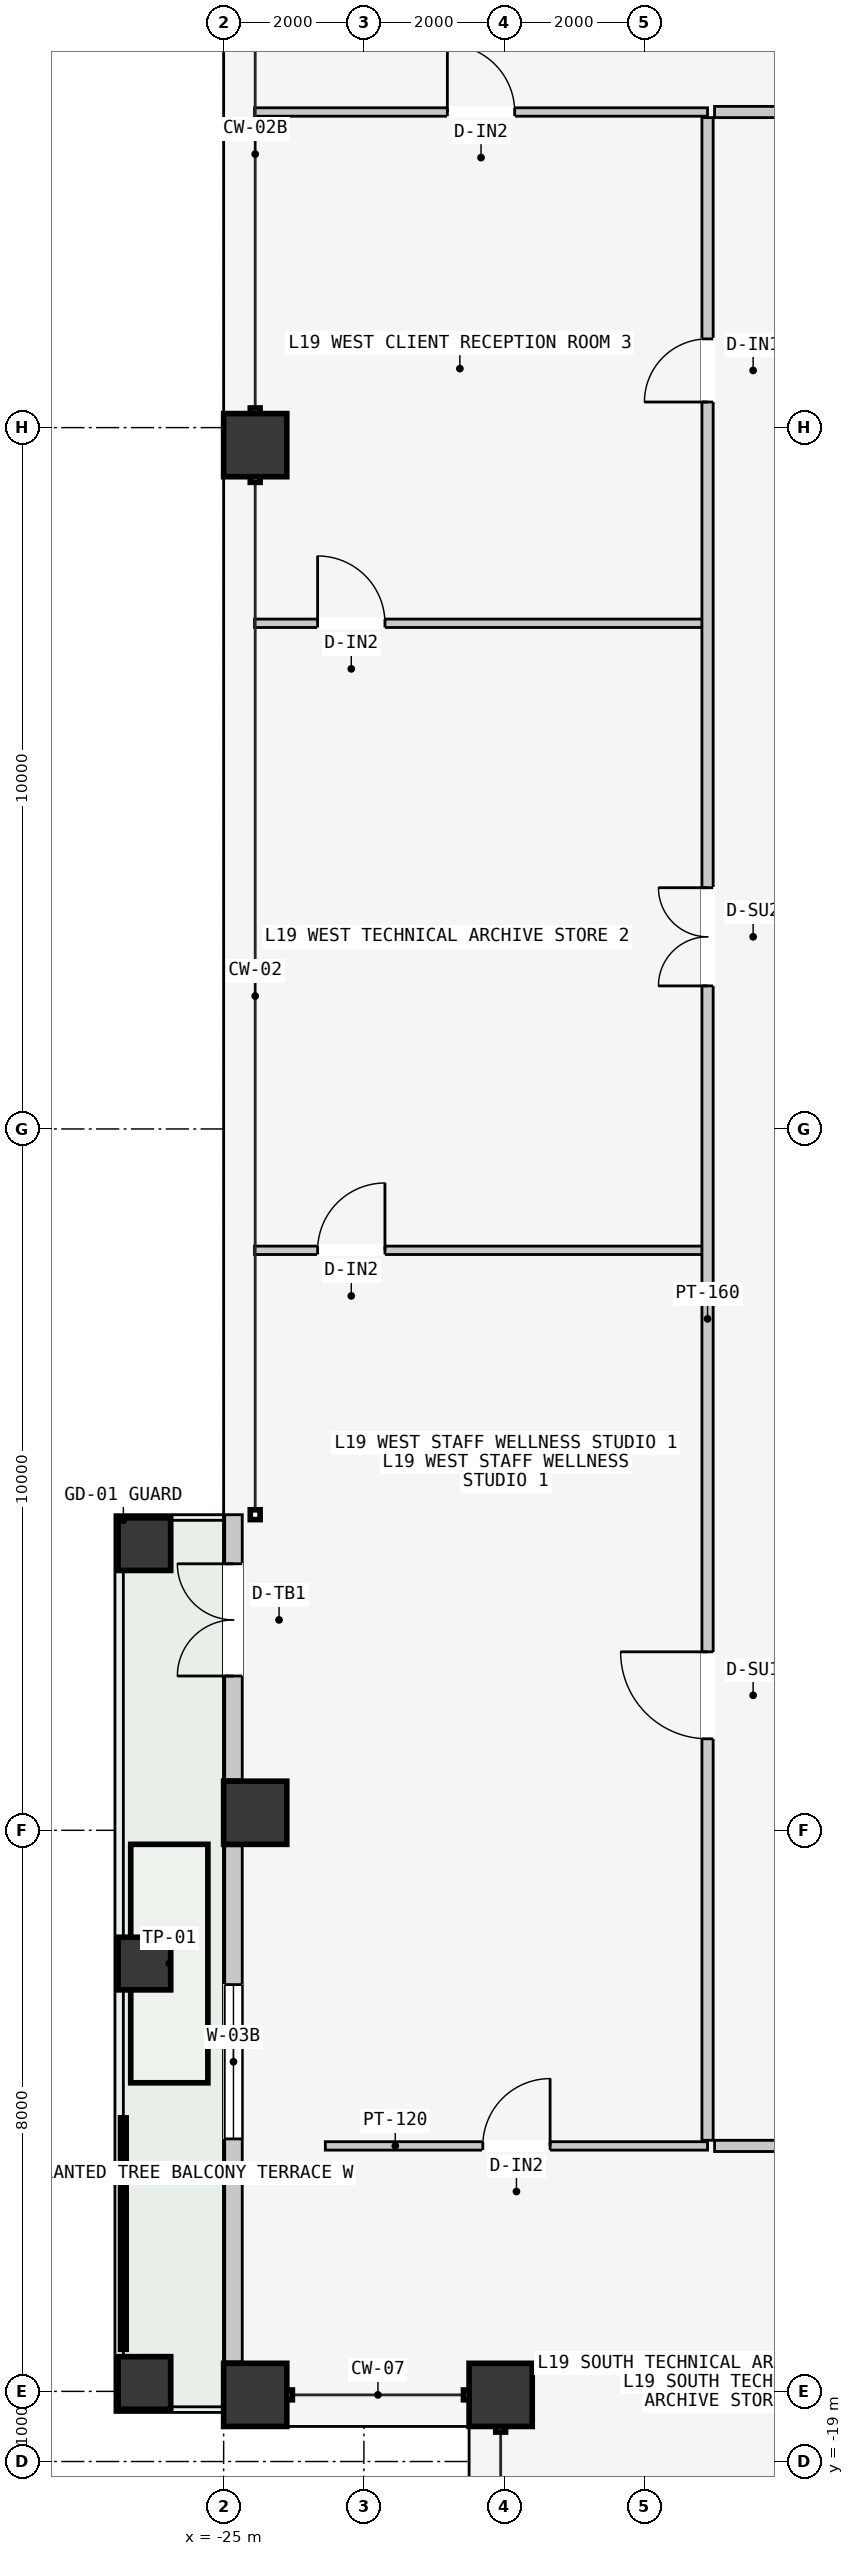
"""IFC4 building model, lengths in metres.
Left out: names, types, materials, properties, quantities, classifications, styles, units other than length and angle.
Written with IfcOpenShell. Run it as: python <this file> out.ifc"""

import sys

from ifc_helpers import new_model, si_unit, direction, frame, frame_2d, origin, origin_2d, place, context, subcontext, project, spatial, rectangle, hollow_rectangle, extrude, element, fill, save


model = new_model("IFC4")
c1 = context("Model", 3, precision=1e-05, world=origin(), true_north=direction((0.0, 1.0)))
c2 = subcontext(c1, "Body", "Model", "MODEL_VIEW")
j1 = project(units=[si_unit("LENGTHUNIT", "METRE"), si_unit("PLANEANGLEUNIT", "RADIAN")], contexts=[c1])
p1 = place(None, origin())
s1 = spatial("IfcSite", under=j1, at=p1, CompositionType="ELEMENT")
p2 = place(p1, origin())
s2 = spatial("IfcBuilding", under=s1, at=p2, CompositionType="ELEMENT")
p3 = place(p2, frame((0.0, 0.0, 74.4)))
s3 = spatial("IfcBuildingStorey", under=s2, at=p3, CompositionType="ELEMENT", Elevation=74.4)
for number, where, z_axis, x_axis in (
    (1, (-24.55, -18.05, 0.0), (0.0, 0.0, 1.0), (0.0, 1.0, 0.0)),
    (2, (-24.55, -9.75, 0.0), (0.0, 0.0, 1.0), (0.0, 1.0, 0.0)),
    (3, (-24.55, 9.75, 0.0), (0.0, 0.0, 1.0), (0.0, 1.0, 0.0)),
    (4, (-21.05, -18.05, 0.0), (0.0, 0.0, 1.0), (1.0, 0.0, 0.0)),
):
    element("IfcColumn", number, at=place(p3, frame(where, z_axis=z_axis, x_axis=x_axis)), inside=s3, PredefinedType="COLUMN", context=c2, shape_type="SweptSolid", body=[
        extrude(hollow_rectangle(XDim=0.9, YDim=0.9, WallThickness=0.045, at=origin_2d()), origin(), (0.0, 0.0, 1.0), 3.6),
    ])
for number, where, z_axis, x_axis in (
    (5, (-26.13, -17.88, 0.0), (0.0, 0.0, 1.0), (0.0, 1.0, 0.0)),
    (6, (-26.13, -5.92, 0.0), (0.0, 0.0, 1.0), (0.0, 1.0, 0.0)),
    (7, (-26.13, -11.9, 0.0), (0.0, 0.0, 1.0), (0.0, 1.0, 0.0)),
):
    element("IfcColumn", number, at=place(p3, frame(where, z_axis=z_axis, x_axis=x_axis)), inside=s3, PredefinedType="COLUMN", context=c2, shape_type="SweptSolid", body=[
        extrude(hollow_rectangle(XDim=0.75, YDim=0.75, WallThickness=0.032, at=origin_2d()), origin(), (0.0, 0.0, 1.0), 3.6),
    ])
p4 = place(p3, frame((-24.86, -17.58, 0.0), z_axis=(0.0, 0.0, 1.0), x_axis=(0.0, 1.0, 0.0)))
e8 = element("IfcWall", 8, at=p4, inside=s3, PredefinedType="STANDARD", context=c2, shape_type="SweptSolid", body=[
    extrude(rectangle(XDim=7.36, YDim=0.25, at=frame_2d((3.68, 0.0))), origin(), (0.0, 0.0, 1.0), 3.4),
])
p5 = place(p4, frame((3.18, 0.0, 0.85)))
e9 = element("IfcOpeningElement", 9, at=p5, cuts=e8, PredefinedType="OPENING", context=c2, shape_type="SweptSolid", body=[
    extrude(rectangle(XDim=2.2, YDim=2.1, at=frame_2d((1.1, 1.05))), frame((0.0, 0.135, 0.0), z_axis=(0.0, -1.0, 0.0), x_axis=(1.0, 0.0, 0.0)), (0.0, 0.0, 1.0), 0.27),
])
p6 = place(p3, frame((-24.86, -9.28, 0.0), z_axis=(0.0, 0.0, 1.0), x_axis=(0.0, 1.0, 0.0)))
e10 = element("IfcWall", 10, at=p6, inside=s3, PredefinedType="STANDARD", context=c2, shape_type="SweptSolid", body=[
    extrude(rectangle(XDim=3.78, YDim=0.25, at=frame_2d((1.89, 0.0))), origin(), (0.0, 0.0, 1.0), 3.4),
])
p7 = place(p6, frame((1.48, 0.0, 0.0)))
e11 = element("IfcOpeningElement", 11, at=p7, cuts=e10, PredefinedType="OPENING", context=c2, shape_type="SweptSolid", body=[
    extrude(rectangle(XDim=1.6, YDim=2.2, at=frame_2d((0.8, 1.1))), frame((0.0, 0.135, 0.0), z_axis=(0.0, -1.0, 0.0), x_axis=(1.0, 0.0, 0.0)), (0.0, 0.0, 1.0), 0.27),
])
p8 = place(p3, frame((-18.0, 14.5, 0.0), z_axis=(0.0, 0.0, 1.0), x_axis=(1.0, 0.0, 0.0)))
e12 = element("IfcWall", 12, at=p8, inside=s3, PredefinedType="PARTITIONING", context=c2, shape_type="SweptSolid", body=[
    extrude(rectangle(XDim=36.0, YDim=0.16, at=frame_2d((18.0, 0.0))), origin(), (0.0, 0.0, 1.0), 3.4),
])
p9 = place(p8, frame((4.09, 0.0, 0.0)))
e13 = element("IfcOpeningElement", 13, at=p9, cuts=e12, PredefinedType="OPENING", context=c2, shape_type="SweptSolid", body=[
    extrude(rectangle(XDim=1.06, YDim=2.2, at=frame_2d((0.53, 1.1))), frame((0.0, 0.09, 0.0), z_axis=(0.0, -1.0, 0.0), x_axis=(1.0, 0.0, 0.0)), (0.0, 0.0, 1.0), 0.18),
])
p10 = place(p8, frame((17.579, 0.0, 0.0)))
e14 = element("IfcOpeningElement", 14, at=p10, cuts=e12, PredefinedType="OPENING", context=c2, shape_type="SweptSolid", body=[
    extrude(rectangle(XDim=1.24, YDim=2.24, at=frame_2d((0.62, 1.12))), frame((0.0, 0.09, 0.0), z_axis=(0.0, -1.0, 0.0), x_axis=(1.0, 0.0, 0.0)), (0.0, 0.0, 1.0), 0.18),
])
p11 = place(p8, frame((30.879, 0.0, 0.0)))
e15 = element("IfcOpeningElement", 15, at=p11, cuts=e12, PredefinedType="OPENING", context=c2, shape_type="SweptSolid", body=[
    extrude(rectangle(XDim=1.4, YDim=2.2, at=frame_2d((0.7, 1.1))), frame((0.0, 0.09, 0.0), z_axis=(0.0, -1.0, 0.0), x_axis=(1.0, 0.0, 0.0)), (0.0, 0.0, 1.0), 0.18),
])
p12 = place(p3, frame((-24.56, 14.5, 0.0), z_axis=(0.0, 0.0, 1.0), x_axis=(1.0, 0.0, 0.0)))
e16 = element("IfcWall", 16, at=p12, inside=s3, PredefinedType="PARTITIONING", context=c2, shape_type="SweptSolid", body=[
    extrude(rectangle(XDim=6.46, YDim=0.12, at=frame_2d((3.23, 0.0))), origin(), (0.0, 0.0, 1.0), 3.4),
])
p13 = place(p12, frame((2.75, 0.0, 0.0)))
e17 = element("IfcOpeningElement", 17, at=p13, cuts=e16, PredefinedType="OPENING", context=c2, shape_type="SweptSolid", body=[
    extrude(rectangle(XDim=0.96, YDim=2.18, at=frame_2d((0.48, 1.09))), frame((0.0, 0.07, 0.0), z_axis=(0.0, -1.0, 0.0), x_axis=(1.0, 0.0, 0.0)), (0.0, 0.0, 1.0), 0.14),
])
p14 = place(p3, frame((-18.0, -14.5, 0.0), z_axis=(0.0, 0.0, 1.0), x_axis=(1.0, 0.0, 0.0)))
e18 = element("IfcWall", 18, at=p14, inside=s3, PredefinedType="PARTITIONING", context=c2, shape_type="SweptSolid", body=[
    extrude(rectangle(XDim=36.0, YDim=0.16, at=frame_2d((18.0, 0.0))), origin(), (0.0, 0.0, 1.0), 3.4),
])
p15 = place(p14, frame((1.515, 0.0, 0.0)))
e19 = element("IfcOpeningElement", 19, at=p15, cuts=e18, PredefinedType="OPENING", context=c2, shape_type="SweptSolid", body=[
    extrude(rectangle(XDim=0.9, YDim=2.15, at=frame_2d((0.45, 1.075))), frame((0.0, 0.09, 0.0), z_axis=(0.0, -1.0, 0.0), x_axis=(1.0, 0.0, 0.0)), (0.0, 0.0, 1.0), 0.18),
])
p16 = place(p14, frame((7.299, 0.0, 0.0)))
e20 = element("IfcOpeningElement", 20, at=p16, cuts=e18, PredefinedType="OPENING", context=c2, shape_type="SweptSolid", body=[
    extrude(rectangle(XDim=0.96, YDim=2.18, at=frame_2d((0.48, 1.09))), frame((0.0, 0.09, 0.0), z_axis=(0.0, -1.0, 0.0), x_axis=(1.0, 0.0, 0.0)), (0.0, 0.0, 1.0), 0.18),
])
p17 = place(p14, frame((15.101, 0.0, 0.0)))
e21 = element("IfcOpeningElement", 21, at=p17, cuts=e18, PredefinedType="OPENING", context=c2, shape_type="SweptSolid", body=[
    extrude(rectangle(XDim=1.02, YDim=2.2, at=frame_2d((0.51, 1.1))), frame((0.0, 0.09, 0.0), z_axis=(0.0, -1.0, 0.0), x_axis=(1.0, 0.0, 0.0)), (0.0, 0.0, 1.0), 0.18),
])
p18 = place(p14, frame((23.443, 0.0, 0.0)))
e22 = element("IfcOpeningElement", 22, at=p18, cuts=e18, PredefinedType="OPENING", context=c2, shape_type="SweptSolid", body=[
    extrude(rectangle(XDim=1.06, YDim=2.2, at=frame_2d((0.53, 1.1))), frame((0.0, 0.09, 0.0), z_axis=(0.0, -1.0, 0.0), x_axis=(1.0, 0.0, 0.0)), (0.0, 0.0, 1.0), 0.18),
])
p19 = place(p14, frame((31.557, 0.0, 0.0)))
e23 = element("IfcOpeningElement", 23, at=p19, cuts=e18, PredefinedType="OPENING", context=c2, shape_type="SweptSolid", body=[
    extrude(rectangle(XDim=1.24, YDim=2.24, at=frame_2d((0.62, 1.12))), frame((0.0, 0.09, 0.0), z_axis=(0.0, -1.0, 0.0), x_axis=(1.0, 0.0, 0.0)), (0.0, 0.0, 1.0), 0.18),
])
p20 = place(p3, frame((-23.55, -14.5, 0.0), z_axis=(0.0, 0.0, 1.0), x_axis=(1.0, 0.0, 0.0)))
e24 = element("IfcWall", 24, at=p20, inside=s3, PredefinedType="PARTITIONING", context=c2, shape_type="SweptSolid", body=[
    extrude(rectangle(XDim=5.45, YDim=0.12, at=frame_2d((2.725, 0.0))), origin(), (0.0, 0.0, 1.0), 3.4),
])
p21 = place(p20, frame((2.245, 0.0, 0.0)))
e25 = element("IfcOpeningElement", 25, at=p21, cuts=e24, PredefinedType="OPENING", context=c2, shape_type="SweptSolid", body=[
    extrude(rectangle(XDim=0.96, YDim=2.18, at=frame_2d((0.48, 1.09))), frame((0.0, 0.07, 0.0), z_axis=(0.0, -1.0, 0.0), x_axis=(1.0, 0.0, 0.0)), (0.0, 0.0, 1.0), 0.14),
])
p22 = place(p3, frame((-24.56, -1.73, 0.0), z_axis=(0.0, 0.0, 1.0), x_axis=(1.0, 0.0, 0.0)))
e26 = element("IfcWall", 26, at=p22, inside=s3, PredefinedType="PARTITIONING", context=c2, shape_type="SweptSolid", body=[
    extrude(rectangle(XDim=6.4, YDim=0.12, at=frame_2d((3.2, 0.0))), origin(), (0.0, 0.0, 1.0), 3.4),
])
p23 = place(p22, frame((0.9, 0.0, 0.0)))
e27 = element("IfcOpeningElement", 27, at=p23, cuts=e26, PredefinedType="OPENING", context=c2, shape_type="SweptSolid", body=[
    extrude(rectangle(XDim=0.96, YDim=2.18, at=frame_2d((0.48, 1.09))), frame((0.0, 0.07, 0.0), z_axis=(0.0, -1.0, 0.0), x_axis=(1.0, 0.0, 0.0)), (0.0, 0.0, 1.0), 0.14),
])
p24 = place(p3, frame((-24.56, 7.21, 0.0), z_axis=(0.0, 0.0, 1.0), x_axis=(1.0, 0.0, 0.0)))
e28 = element("IfcWall", 28, at=p24, inside=s3, PredefinedType="PARTITIONING", context=c2, shape_type="SweptSolid", body=[
    extrude(rectangle(XDim=6.4, YDim=0.12, at=frame_2d((3.2, 0.0))), origin(), (0.0, 0.0, 1.0), 3.4),
])
p25 = place(p24, frame((0.9, 0.0, 0.0)))
e29 = element("IfcOpeningElement", 29, at=p25, cuts=e28, PredefinedType="OPENING", context=c2, shape_type="SweptSolid", body=[
    extrude(rectangle(XDim=0.96, YDim=2.18, at=frame_2d((0.48, 1.09))), frame((0.0, 0.07, 0.0), z_axis=(0.0, -1.0, 0.0), x_axis=(1.0, 0.0, 0.0)), (0.0, 0.0, 1.0), 0.14),
])
p26 = place(p3, frame((-18.1, -14.42, 0.0), z_axis=(0.0, 0.0, 1.0), x_axis=(0.0, 1.0, 0.0)))
e30 = element("IfcWall", 30, at=p26, inside=s3, PredefinedType="PARTITIONING", context=c2, shape_type="SweptSolid", body=[
    extrude(rectangle(XDim=28.84, YDim=0.16, at=frame_2d((14.42, 0.0))), origin(), (0.0, 0.0, 1.0), 3.4),
])
p27 = place(p26, frame((5.725, 0.0, 0.0)))
e31 = element("IfcOpeningElement", 31, at=p27, cuts=e30, PredefinedType="OPENING", context=c2, shape_type="SweptSolid", body=[
    extrude(rectangle(XDim=1.24, YDim=2.24, at=frame_2d((0.62, 1.12))), frame((0.0, 0.09, 0.0), z_axis=(0.0, -1.0, 0.0), x_axis=(1.0, 0.0, 0.0)), (0.0, 0.0, 1.0), 0.18),
])
p28 = place(p26, frame((16.46, 0.0, 0.0)))
e32 = element("IfcOpeningElement", 32, at=p28, cuts=e30, PredefinedType="OPENING", context=c2, shape_type="SweptSolid", body=[
    extrude(rectangle(XDim=1.4, YDim=2.2, at=frame_2d((0.7, 1.1))), frame((0.0, 0.09, 0.0), z_axis=(0.0, -1.0, 0.0), x_axis=(1.0, 0.0, 0.0)), (0.0, 0.0, 1.0), 0.18),
])
p29 = place(p26, frame((24.785, 0.0, 0.0)))
e33 = element("IfcOpeningElement", 33, at=p29, cuts=e30, PredefinedType="OPENING", context=c2, shape_type="SweptSolid", body=[
    extrude(rectangle(XDim=0.9, YDim=2.15, at=frame_2d((0.45, 1.075))), frame((0.0, 0.09, 0.0), z_axis=(0.0, -1.0, 0.0), x_axis=(1.0, 0.0, 0.0)), (0.0, 0.0, 1.0), 0.18),
])
p30 = place(p5, origin())
e34 = element("IfcWindow", 34, at=p30, inside=s3, PartitioningType="SINGLE_PANEL", PredefinedType="WINDOW", context=c2, shape_type="SweptSolid", body=[
    extrude(rectangle(XDim=2.2, YDim=2.1, at=frame_2d((1.1, 1.05))), frame((0.0, 0.03, 0.0), z_axis=(0.0, -1.0, 0.0), x_axis=(1.0, 0.0, 0.0)), (0.0, 0.0, 1.0), 0.06),
])
fill(e9, e34)
p31 = place(p7, origin())
e35 = element("IfcDoor", 35, at=p31, inside=s3, OperationType="DOUBLE_DOOR_SINGLE_SWING", PredefinedType="DOOR", context=c2, shape_type="SweptSolid", body=[
    extrude(rectangle(XDim=1.6, YDim=2.2, at=frame_2d((0.8, 1.1))), frame((0.0, 0.025, 0.0), z_axis=(0.0, -1.0, 0.0), x_axis=(1.0, 0.0, 0.0)), (0.0, 0.0, 1.0), 0.05),
])
fill(e11, e35)
p32 = place(p13, origin())
e36 = element("IfcDoor", 36, at=p32, inside=s3, OperationType="SINGLE_SWING_LEFT", PredefinedType="DOOR", context=c2, shape_type="SweptSolid", body=[
    extrude(rectangle(XDim=0.96, YDim=2.18, at=frame_2d((0.48, 1.09))), frame((0.0, 0.025, 0.0), z_axis=(0.0, -1.0, 0.0), x_axis=(1.0, 0.0, 0.0)), (0.0, 0.0, 1.0), 0.05),
])
fill(e17, e36)
p33 = place(p21, origin())
e37 = element("IfcDoor", 37, at=p33, inside=s3, OperationType="SINGLE_SWING_RIGHT", PredefinedType="DOOR", context=c2, shape_type="SweptSolid", body=[
    extrude(rectangle(XDim=0.96, YDim=2.18, at=frame_2d((0.48, 1.09))), frame((0.0, 0.025, 0.0), z_axis=(0.0, -1.0, 0.0), x_axis=(1.0, 0.0, 0.0)), (0.0, 0.0, 1.0), 0.05),
])
fill(e25, e37)
p34 = place(p23, origin())
e38 = element("IfcDoor", 38, at=p34, inside=s3, OperationType="SINGLE_SWING_RIGHT", PredefinedType="DOOR", context=c2, shape_type="SweptSolid", body=[
    extrude(rectangle(XDim=0.96, YDim=2.18, at=frame_2d((0.48, 1.09))), frame((0.0, 0.025, 0.0), z_axis=(0.0, -1.0, 0.0), x_axis=(1.0, 0.0, 0.0)), (0.0, 0.0, 1.0), 0.05),
])
fill(e27, e38)
p35 = place(p25, origin())
e39 = element("IfcDoor", 39, at=p35, inside=s3, OperationType="SINGLE_SWING_LEFT", PredefinedType="DOOR", context=c2, shape_type="SweptSolid", body=[
    extrude(rectangle(XDim=0.96, YDim=2.18, at=frame_2d((0.48, 1.09))), frame((0.0, 0.025, 0.0), z_axis=(0.0, -1.0, 0.0), x_axis=(1.0, 0.0, 0.0)), (0.0, 0.0, 1.0), 0.05),
])
fill(e29, e39)
p36 = place(p27, origin())
e40 = element("IfcDoor", 40, at=p36, inside=s3, OperationType="SINGLE_SWING_RIGHT", PredefinedType="DOOR", context=c2, shape_type="SweptSolid", body=[
    extrude(rectangle(XDim=1.24, YDim=2.24, at=frame_2d((0.62, 1.12))), frame((0.0, 0.025, 0.0), z_axis=(0.0, -1.0, 0.0), x_axis=(1.0, 0.0, 0.0)), (0.0, 0.0, 1.0), 0.05),
])
fill(e31, e40)
p37 = place(p28, origin())
e41 = element("IfcDoor", 41, at=p37, inside=s3, OperationType="DOUBLE_DOOR_SINGLE_SWING", PredefinedType="DOOR", context=c2, shape_type="SweptSolid", body=[
    extrude(rectangle(XDim=1.4, YDim=2.2, at=frame_2d((0.7, 1.1))), frame((0.0, 0.025, 0.0), z_axis=(0.0, -1.0, 0.0), x_axis=(1.0, 0.0, 0.0)), (0.0, 0.0, 1.0), 0.05),
])
fill(e32, e41)
p38 = place(p29, origin())
e42 = element("IfcDoor", 42, at=p38, inside=s3, OperationType="SINGLE_SWING_LEFT", PredefinedType="DOOR", context=c2, shape_type="SweptSolid", body=[
    extrude(rectangle(XDim=0.9, YDim=2.15, at=frame_2d((0.45, 1.075))), frame((0.0, 0.025, 0.0), z_axis=(0.0, -1.0, 0.0), x_axis=(1.0, 0.0, 0.0)), (0.0, 0.0, 1.0), 0.05),
])
fill(e33, e42)
save(model, sys.argv[1])
